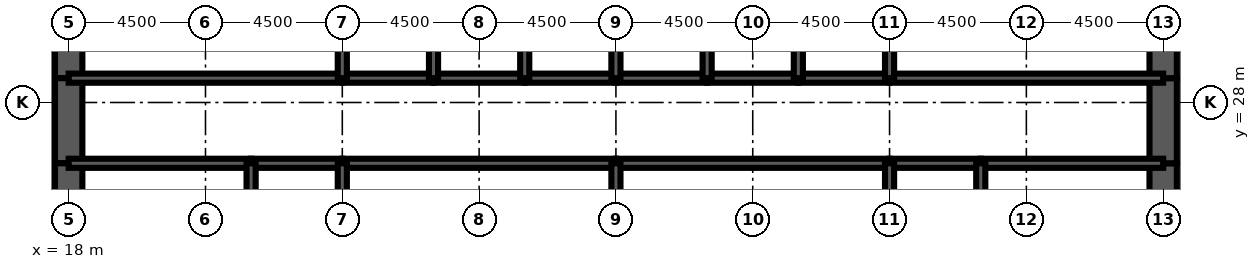
"""IFC4 building model, lengths in metres.
Left out: names, types, materials, properties, quantities, classifications, styles, units other than length and angle.
Written with IfcOpenShell. Run it as: python <this file> out.ifc"""

import sys

from ifc_helpers import new_model, si_unit, direction, frame, frame_2d, origin, place, context, subcontext, project, spatial, rectangle, extrude, element, fill, save


model = new_model("IFC4")
c1 = context("Model", 3, precision=1e-05, world=origin(), true_north=direction((0.0, 1.0)))
c2 = subcontext(c1, "Body", "Model", "MODEL_VIEW")
j1 = project(units=[si_unit("LENGTHUNIT", "METRE"), si_unit("PLANEANGLEUNIT", "RADIAN")], contexts=[c1])
p1 = place(None, origin())
s1 = spatial("IfcSite", under=j1, at=p1, CompositionType="ELEMENT")
p2 = place(p1, origin())
s2 = spatial("IfcBuilding", under=s1, at=p2, CompositionType="ELEMENT")
p3 = place(p2, frame((0.0, 0.0, 59.0)))
s3 = spatial("IfcBuildingStorey", under=s2, at=p3, CompositionType="ELEMENT", Elevation=59.0)
p4 = place(p3, frame((18.0, 32.0, 0.0), z_axis=(0.0, 0.0, 1.0), x_axis=(0.0, -1.0, 0.0)))
e1 = element("IfcWall", 1, at=p4, inside=s3, PredefinedType="SHEAR", context=c2, shape_type="SweptSolid", body=[
    extrude(rectangle(XDim=3.2, YDim=0.9, at=frame_2d((1.6, 0.0))), origin(), (0.0, 0.0, 1.0), 4.5),
])
p5 = place(p3, frame((18.0, 28.8, 0.0), z_axis=(0.0, 0.0, 1.0), x_axis=(0.0, -1.0, 0.0)))
e2 = element("IfcWall", 2, at=p5, inside=s3, PredefinedType="SHEAR", context=c2, shape_type="SweptSolid", body=[
    extrude(rectangle(XDim=2.8, YDim=0.9, at=frame_2d((1.4, 0.0))), origin(), (0.0, 0.0, 1.0), 4.5),
])
p6 = place(p5, frame((0.4, 0.0, 0.0)))
e3 = element("IfcOpeningElement", 3, at=p6, cuts=e2, PredefinedType="OPENING", context=c2, shape_type="SweptSolid", body=[
    extrude(rectangle(XDim=1.8, YDim=2.1, at=frame_2d((0.9, 1.05))), frame((0.0, 0.46, 0.0), z_axis=(0.0, -1.0, 0.0), x_axis=(1.0, 0.0, 0.0)), (0.0, 0.0, 1.0), 0.92),
])
for number, where, z_axis, x_axis in (
    (4, (18.0, 26.0, 0.0), (0.0, 0.0, 1.0), (0.0, -1.0, 0.0)),
    (5, (54.0, 22.0, 0.0), (0.0, 0.0, 1.0), (0.0, 1.0, 0.0)),
):
    element("IfcWall", number, at=place(p3, frame(where, z_axis=z_axis, x_axis=x_axis)), inside=s3, PredefinedType="SHEAR", context=c2, shape_type="SweptSolid", body=[
        extrude(rectangle(XDim=4.0, YDim=0.9, at=frame_2d((2.0, 0.0))), origin(), (0.0, 0.0, 1.0), 4.5),
    ])
p7 = place(p3, frame((54.0, 26.0, 0.0), z_axis=(0.0, 0.0, 1.0), x_axis=(0.0, 1.0, 0.0)))
e6 = element("IfcWall", 6, at=p7, inside=s3, PredefinedType="SHEAR", context=c2, shape_type="SweptSolid", body=[
    extrude(rectangle(XDim=2.8, YDim=0.9, at=frame_2d((1.4, 0.0))), origin(), (0.0, 0.0, 1.0), 4.5),
])
p8 = place(p7, frame((0.6, 0.0, 0.0)))
e7 = element("IfcOpeningElement", 7, at=p8, cuts=e6, PredefinedType="OPENING", context=c2, shape_type="SweptSolid", body=[
    extrude(rectangle(XDim=1.8, YDim=2.1, at=frame_2d((0.9, 1.05))), frame((0.0, 0.46, 0.0), z_axis=(0.0, -1.0, 0.0), x_axis=(1.0, 0.0, 0.0)), (0.0, 0.0, 1.0), 0.92),
])
p9 = place(p3, frame((54.0, 28.8, 0.0), z_axis=(0.0, 0.0, 1.0), x_axis=(0.0, 1.0, 0.0)))
e8 = element("IfcWall", 8, at=p9, inside=s3, PredefinedType="SHEAR", context=c2, shape_type="SweptSolid", body=[
    extrude(rectangle(XDim=3.2, YDim=0.9, at=frame_2d((1.6, 0.0))), origin(), (0.0, 0.0, 1.0), 4.5),
])
p10 = place(p3, frame((18.0, 28.8, 0.0), z_axis=(0.0, 0.0, 1.0), x_axis=(1.0, 0.0, 0.0)))
e9 = element("IfcWall", 9, at=p10, inside=s3, PredefinedType="SOLIDWALL", context=c2, shape_type="SweptSolid", body=[
    extrude(rectangle(XDim=9.0, YDim=0.3, at=frame_2d((4.5, 0.0))), origin(), (0.0, 0.0, 1.0), 4.5),
])
p11 = place(p10, frame((0.65, 0.0, 0.0)))
e10 = element("IfcOpeningElement", 10, at=p11, cuts=e9, PredefinedType="OPENING", context=c2, shape_type="SweptSolid", body=[
    extrude(rectangle(XDim=1.0, YDim=2.1, at=frame_2d((0.5, 1.05))), frame((0.0, 0.16, 0.0), z_axis=(0.0, -1.0, 0.0), x_axis=(1.0, 0.0, 0.0)), (0.0, 0.0, 1.0), 0.32),
])
p12 = place(p3, frame((27.0, 28.8, 0.0), z_axis=(0.0, 0.0, 1.0), x_axis=(1.0, 0.0, 0.0)))
e11 = element("IfcWall", 11, at=p12, inside=s3, PredefinedType="SOLIDWALL", context=c2, shape_type="SweptSolid", body=[
    extrude(rectangle(XDim=3.0, YDim=0.3, at=frame_2d((1.5, 0.0))), origin(), (0.0, 0.0, 1.0), 4.5),
])
p13 = place(p12, frame((0.95, 0.0, 0.0)))
e12 = element("IfcOpeningElement", 12, at=p13, cuts=e11, PredefinedType="OPENING", context=c2, shape_type="SweptSolid", body=[
    extrude(rectangle(XDim=1.1, YDim=2.2, at=frame_2d((0.55, 1.1))), frame((0.0, 0.16, 0.0), z_axis=(0.0, -1.0, 0.0), x_axis=(1.0, 0.0, 0.0)), (0.0, 0.0, 1.0), 0.32),
])
p14 = place(p3, frame((30.0, 28.8, 0.0), z_axis=(0.0, 0.0, 1.0), x_axis=(1.0, 0.0, 0.0)))
e13 = element("IfcWall", 13, at=p14, inside=s3, PredefinedType="SOLIDWALL", context=c2, shape_type="SweptSolid", body=[
    extrude(rectangle(XDim=3.0, YDim=0.3, at=frame_2d((1.5, 0.0))), origin(), (0.0, 0.0, 1.0), 4.5),
])
p15 = place(p14, frame((0.95, 0.0, 0.0)))
e14 = element("IfcOpeningElement", 14, at=p15, cuts=e13, PredefinedType="OPENING", context=c2, shape_type="SweptSolid", body=[
    extrude(rectangle(XDim=1.1, YDim=2.2, at=frame_2d((0.55, 1.1))), frame((0.0, 0.16, 0.0), z_axis=(0.0, -1.0, 0.0), x_axis=(1.0, 0.0, 0.0)), (0.0, 0.0, 1.0), 0.32),
])
p16 = place(p3, frame((33.0, 28.8, 0.0), z_axis=(0.0, 0.0, 1.0), x_axis=(1.0, 0.0, 0.0)))
e15 = element("IfcWall", 15, at=p16, inside=s3, PredefinedType="SOLIDWALL", context=c2, shape_type="SweptSolid", body=[
    extrude(rectangle(XDim=3.0, YDim=0.3, at=frame_2d((1.5, 0.0))), origin(), (0.0, 0.0, 1.0), 4.5),
])
p17 = place(p16, frame((0.95, 0.0, 0.0)))
e16 = element("IfcOpeningElement", 16, at=p17, cuts=e15, PredefinedType="OPENING", context=c2, shape_type="SweptSolid", body=[
    extrude(rectangle(XDim=1.1, YDim=2.2, at=frame_2d((0.55, 1.1))), frame((0.0, 0.16, 0.0), z_axis=(0.0, -1.0, 0.0), x_axis=(1.0, 0.0, 0.0)), (0.0, 0.0, 1.0), 0.32),
])
for number, where, z_axis, x_axis in (
    (17, (36.0, 28.8, 0.0), (0.0, 0.0, 1.0), (1.0, 0.0, 0.0)),
    (18, (39.0, 28.8, 0.0), (0.0, 0.0, 1.0), (1.0, 0.0, 0.0)),
):
    element("IfcWall", number, at=place(p3, frame(where, z_axis=z_axis, x_axis=x_axis)), inside=s3, PredefinedType="SOLIDWALL", context=c2, shape_type="SweptSolid", body=[
        extrude(rectangle(XDim=3.0, YDim=0.3, at=frame_2d((1.5, 0.0))), origin(), (0.0, 0.0, 1.0), 4.5),
    ])
p18 = place(p3, frame((42.0, 28.8, 0.0), z_axis=(0.0, 0.0, 1.0), x_axis=(1.0, 0.0, 0.0)))
e19 = element("IfcWall", 19, at=p18, inside=s3, PredefinedType="SOLIDWALL", context=c2, shape_type="SweptSolid", body=[
    extrude(rectangle(XDim=3.0, YDim=0.3, at=frame_2d((1.5, 0.0))), origin(), (0.0, 0.0, 1.0), 4.5),
])
p19 = place(p18, frame((0.95, 0.0, 0.0)))
e20 = element("IfcOpeningElement", 20, at=p19, cuts=e19, PredefinedType="OPENING", context=c2, shape_type="SweptSolid", body=[
    extrude(rectangle(XDim=1.1, YDim=2.2, at=frame_2d((0.55, 1.1))), frame((0.0, 0.16, 0.0), z_axis=(0.0, -1.0, 0.0), x_axis=(1.0, 0.0, 0.0)), (0.0, 0.0, 1.0), 0.32),
])
p20 = place(p3, frame((45.0, 28.8, 0.0), z_axis=(0.0, 0.0, 1.0), x_axis=(1.0, 0.0, 0.0)))
e21 = element("IfcWall", 21, at=p20, inside=s3, PredefinedType="SOLIDWALL", context=c2, shape_type="SweptSolid", body=[
    extrude(rectangle(XDim=9.0, YDim=0.3, at=frame_2d((4.5, 0.0))), origin(), (0.0, 0.0, 1.0), 4.5),
])
p21 = place(p20, frame((7.35, 0.0, 0.0)))
e22 = element("IfcOpeningElement", 22, at=p21, cuts=e21, PredefinedType="OPENING", context=c2, shape_type="SweptSolid", body=[
    extrude(rectangle(XDim=1.0, YDim=2.1, at=frame_2d((0.5, 1.05))), frame((0.0, 0.16, 0.0), z_axis=(0.0, -1.0, 0.0), x_axis=(1.0, 0.0, 0.0)), (0.0, 0.0, 1.0), 0.32),
])
p22 = place(p3, frame((18.0, 26.0, 0.0), z_axis=(0.0, 0.0, 1.0), x_axis=(1.0, 0.0, 0.0)))
e23 = element("IfcWall", 23, at=p22, inside=s3, PredefinedType="SOLIDWALL", context=c2, shape_type="SweptSolid", body=[
    extrude(rectangle(XDim=6.0, YDim=0.3, at=frame_2d((3.0, 0.0))), origin(), (0.0, 0.0, 1.0), 4.5),
])
p23 = place(p3, frame((24.0, 26.0, 0.0), z_axis=(0.0, 0.0, 1.0), x_axis=(1.0, 0.0, 0.0)))
e24 = element("IfcWall", 24, at=p23, inside=s3, PredefinedType="SOLIDWALL", context=c2, shape_type="SweptSolid", body=[
    extrude(rectangle(XDim=3.0, YDim=0.3, at=frame_2d((1.5, 0.0))), origin(), (0.0, 0.0, 1.0), 4.5),
])
for number, where, z_axis, x_axis in (
    (25, (27.0, 26.0, 0.0), (0.0, 0.0, 1.0), (1.0, 0.0, 0.0)),
    (26, (36.0, 26.0, 0.0), (0.0, 0.0, 1.0), (1.0, 0.0, 0.0)),
):
    element("IfcWall", number, at=place(p3, frame(where, z_axis=z_axis, x_axis=x_axis)), inside=s3, PredefinedType="SOLIDWALL", context=c2, shape_type="SweptSolid", body=[
        extrude(rectangle(XDim=9.0, YDim=0.3, at=frame_2d((4.5, 0.0))), origin(), (0.0, 0.0, 1.0), 4.5),
    ])
p24 = place(p3, frame((45.0, 26.0, 0.0), z_axis=(0.0, 0.0, 1.0), x_axis=(1.0, 0.0, 0.0)))
e27 = element("IfcWall", 27, at=p24, inside=s3, PredefinedType="SOLIDWALL", context=c2, shape_type="SweptSolid", body=[
    extrude(rectangle(XDim=3.0, YDim=0.3, at=frame_2d((1.5, 0.0))), origin(), (0.0, 0.0, 1.0), 4.5),
])
p25 = place(p3, frame((48.0, 26.0, 0.0), z_axis=(0.0, 0.0, 1.0), x_axis=(1.0, 0.0, 0.0)))
e28 = element("IfcWall", 28, at=p25, inside=s3, PredefinedType="SOLIDWALL", context=c2, shape_type="SweptSolid", body=[
    extrude(rectangle(XDim=6.0, YDim=0.3, at=frame_2d((3.0, 0.0))), origin(), (0.0, 0.0, 1.0), 4.5),
])
for number, where, z_axis, x_axis in (
    (29, (27.0, 28.8, 0.0), (0.0, 0.0, 1.0), (0.0, 1.0, 0.0)),
    (30, (30.0, 28.8, 0.0), (0.0, 0.0, 1.0), (0.0, 1.0, 0.0)),
    (31, (33.0, 28.8, 0.0), (0.0, 0.0, 1.0), (0.0, 1.0, 0.0)),
    (32, (36.0, 28.8, 0.0), (0.0, 0.0, 1.0), (0.0, 1.0, 0.0)),
    (33, (39.0, 28.8, 0.0), (0.0, 0.0, 1.0), (0.0, 1.0, 0.0)),
    (34, (42.0, 28.8, 0.0), (0.0, 0.0, 1.0), (0.0, 1.0, 0.0)),
    (35, (45.0, 28.8, 0.0), (0.0, 0.0, 1.0), (0.0, 1.0, 0.0)),
):
    element("IfcWall", number, at=place(p3, frame(where, z_axis=z_axis, x_axis=x_axis)), inside=s3, PredefinedType="SOLIDWALL", context=c2, shape_type="SweptSolid", body=[
        extrude(rectangle(XDim=3.2, YDim=0.3, at=frame_2d((1.6, 0.0))), origin(), (0.0, 0.0, 1.0), 4.5),
    ])
for number, where, z_axis, x_axis in (
    (36, (24.0, 22.0, 0.0), (0.0, 0.0, 1.0), (0.0, 1.0, 0.0)),
    (37, (27.0, 22.0, 0.0), (0.0, 0.0, 1.0), (0.0, 1.0, 0.0)),
    (38, (36.0, 22.0, 0.0), (0.0, 0.0, 1.0), (0.0, 1.0, 0.0)),
    (39, (45.0, 22.0, 0.0), (0.0, 0.0, 1.0), (0.0, 1.0, 0.0)),
    (40, (48.0, 22.0, 0.0), (0.0, 0.0, 1.0), (0.0, 1.0, 0.0)),
):
    element("IfcWall", number, at=place(p3, frame(where, z_axis=z_axis, x_axis=x_axis)), inside=s3, PredefinedType="SOLIDWALL", context=c2, shape_type="SweptSolid", body=[
        extrude(rectangle(XDim=4.0, YDim=0.3, at=frame_2d((2.0, 0.0))), origin(), (0.0, 0.0, 1.0), 4.5),
    ])
p26 = place(p3, frame((39.0, 22.15, 0.0), z_axis=(0.0, 0.0, 1.0), x_axis=(0.0, 1.0, 0.0)))
e41 = element("IfcWall", 41, at=p26, inside=s3, PredefinedType="PARTITIONING", context=c2, shape_type="SweptSolid", body=[
    extrude(rectangle(XDim=3.7, YDim=0.15, at=frame_2d((1.85, 0.0))), origin(), (0.0, 0.0, 1.0), 3.0),
])
p27 = place(p26, frame((2.2, 0.0, 0.0)))
e42 = element("IfcOpeningElement", 42, at=p27, cuts=e41, PredefinedType="OPENING", context=c2, shape_type="SweptSolid", body=[
    extrude(rectangle(XDim=1.0, YDim=2.1, at=frame_2d((0.5, 1.05))), frame((0.0, 0.085, 0.0), z_axis=(0.0, -1.0, 0.0), x_axis=(1.0, 0.0, 0.0)), (0.0, 0.0, 1.0), 0.17),
])
for number, where, z_axis, x_axis in (
    (43, (20.625, 22.15, 0.0), (0.0, 0.0, 1.0), (0.0, 1.0, 0.0)),
    (44, (51.675, 22.15, 0.0), (0.0, 0.0, 1.0), (0.0, 1.0, 0.0)),
):
    element("IfcWall", number, at=place(p3, frame(where, z_axis=z_axis, x_axis=x_axis)), inside=s3, PredefinedType="PARTITIONING", context=c2, shape_type="SweptSolid", body=[
        extrude(rectangle(XDim=3.7, YDim=0.15, at=frame_2d((1.85, 0.0))), origin(), (0.0, 0.0, 1.0), 3.0),
    ])
p28 = place(p27, origin())
e45 = element("IfcDoor", 45, at=p28, inside=s3, OperationType="SINGLE_SWING_RIGHT", PredefinedType="DOOR", context=c2, shape_type="SweptSolid", body=[
    extrude(rectangle(XDim=1.0, YDim=2.1, at=frame_2d((0.5, 1.05))), frame((0.0, 0.025, 0.0), z_axis=(0.0, -1.0, 0.0), x_axis=(1.0, 0.0, 0.0)), (0.0, 0.0, 1.0), 0.05),
])
fill(e42, e45)
p29 = place(p19, origin())
e46 = element("IfcDoor", 46, at=p29, inside=s3, OperationType="DOUBLE_DOOR_SLIDING", PredefinedType="USERDEFINED", context=c2, shape_type="SweptSolid", body=[
    extrude(rectangle(XDim=1.1, YDim=2.2, at=frame_2d((0.55, 1.1))), frame((0.0, 0.025, 0.0), z_axis=(0.0, -1.0, 0.0), x_axis=(1.0, 0.0, 0.0)), (0.0, 0.0, 1.0), 0.05),
])
fill(e20, e46)
p30 = place(p13, origin())
e47 = element("IfcDoor", 47, at=p30, inside=s3, OperationType="DOUBLE_DOOR_SLIDING", PredefinedType="USERDEFINED", context=c2, shape_type="SweptSolid", body=[
    extrude(rectangle(XDim=1.1, YDim=2.2, at=frame_2d((0.55, 1.1))), frame((0.0, 0.025, 0.0), z_axis=(0.0, -1.0, 0.0), x_axis=(1.0, 0.0, 0.0)), (0.0, 0.0, 1.0), 0.05),
])
fill(e12, e47)
p31 = place(p15, origin())
e48 = element("IfcDoor", 48, at=p31, inside=s3, OperationType="DOUBLE_DOOR_SLIDING", PredefinedType="USERDEFINED", context=c2, shape_type="SweptSolid", body=[
    extrude(rectangle(XDim=1.1, YDim=2.2, at=frame_2d((0.55, 1.1))), frame((0.0, 0.025, 0.0), z_axis=(0.0, -1.0, 0.0), x_axis=(1.0, 0.0, 0.0)), (0.0, 0.0, 1.0), 0.05),
])
fill(e14, e48)
p32 = place(p17, origin())
e49 = element("IfcDoor", 49, at=p32, inside=s3, OperationType="DOUBLE_DOOR_SLIDING", PredefinedType="USERDEFINED", context=c2, shape_type="SweptSolid", body=[
    extrude(rectangle(XDim=1.1, YDim=2.2, at=frame_2d((0.55, 1.1))), frame((0.0, 0.025, 0.0), z_axis=(0.0, -1.0, 0.0), x_axis=(1.0, 0.0, 0.0)), (0.0, 0.0, 1.0), 0.05),
])
fill(e16, e49)
p33 = place(p11, origin())
e50 = element("IfcDoor", 50, at=p33, inside=s3, OperationType="SINGLE_SWING_LEFT", PredefinedType="DOOR", context=c2, shape_type="SweptSolid", body=[
    extrude(rectangle(XDim=1.0, YDim=2.1, at=frame_2d((0.5, 1.05))), frame((0.0, 0.025, 0.0), z_axis=(0.0, -1.0, 0.0), x_axis=(1.0, 0.0, 0.0)), (0.0, 0.0, 1.0), 0.05),
])
fill(e10, e50)
p34 = place(p21, origin())
e51 = element("IfcDoor", 51, at=p34, inside=s3, OperationType="SINGLE_SWING_RIGHT", PredefinedType="DOOR", context=c2, shape_type="SweptSolid", body=[
    extrude(rectangle(XDim=1.0, YDim=2.1, at=frame_2d((0.5, 1.05))), frame((0.0, 0.025, 0.0), z_axis=(0.0, -1.0, 0.0), x_axis=(1.0, 0.0, 0.0)), (0.0, 0.0, 1.0), 0.05),
])
fill(e22, e51)
p35 = place(p6, origin())
e52 = element("IfcDoor", 52, at=p35, inside=s3, OperationType="SINGLE_SWING_LEFT", PredefinedType="DOOR", context=c2, shape_type="SweptSolid", body=[
    extrude(rectangle(XDim=1.8, YDim=2.1, at=frame_2d((0.9, 1.05))), frame((0.0, 0.45, 0.0), z_axis=(0.0, -1.0, 0.0), x_axis=(1.0, 0.0, 0.0)), (0.0, 0.0, 1.0), 0.899),
])
fill(e3, e52)
p36 = place(p8, origin())
e53 = element("IfcDoor", 53, at=p36, inside=s3, OperationType="SINGLE_SWING_LEFT", PredefinedType="DOOR", context=c2, shape_type="SweptSolid", body=[
    extrude(rectangle(XDim=1.8, YDim=2.1, at=frame_2d((0.9, 1.05))), frame((0.0, 0.45, 0.0), z_axis=(0.0, -1.0, 0.0), x_axis=(1.0, 0.0, 0.0)), (0.0, 0.0, 1.0), 0.899),
])
fill(e7, e53)
save(model, sys.argv[1])
